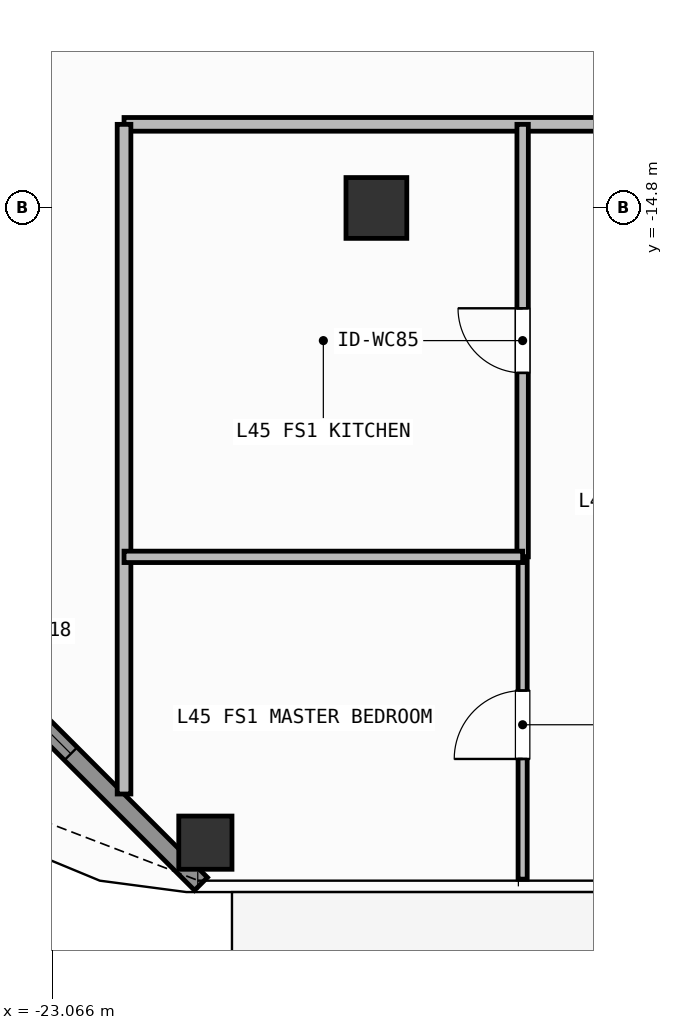
"""IFC4 building model, lengths in metres.
Left out: names, types, materials, properties, quantities, classifications, styles, units other than length and angle.
Written with IfcOpenShell. Run it as: python <this file> out.ifc"""

import sys

from ifc_helpers import new_model, si_unit, direction, frame, frame_2d, origin, origin_2d, place, context, subcontext, project, spatial, rectangle, hollow_rectangle, extrude, element, fill, save


model = new_model("IFC4")
c1 = context("Model", 3, precision=1e-05, world=origin(), true_north=direction((0.0, 1.0)))
c2 = subcontext(c1, "Body", "Model", "MODEL_VIEW")
j1 = project(units=[si_unit("LENGTHUNIT", "METRE"), si_unit("PLANEANGLEUNIT", "RADIAN")], contexts=[c1])
p1 = place(None, origin())
s1 = spatial("IfcSite", under=j1, at=p1, CompositionType="ELEMENT")
p2 = place(p1, origin())
s2 = spatial("IfcBuilding", under=s1, at=p2, CompositionType="ELEMENT")
p3 = place(p2, frame((0.0, 0.0, 183.6)))
s3 = spatial("IfcBuildingStorey", under=s2, at=p3, CompositionType="ELEMENT", Elevation=183.6)
p4 = place(p3, frame((-18.8, -14.8, 0.0), z_axis=(0.0, 0.0, 1.0), x_axis=(1.0, 0.0, 0.0)))
e1 = element("IfcColumn", 1, at=p4, inside=s3, PredefinedType="COLUMN", context=c2, shape_type="SweptSolid", body=[
    extrude(hollow_rectangle(XDim=0.8, YDim=0.8, WallThickness=0.036, at=origin_2d()), origin(), (0.0, 0.0, 1.0), 3.9),
])
p5 = place(p3, frame((-21.05, -23.15, 0.0), z_axis=(0.0, 0.0, 1.0), x_axis=(1.0, 0.0, 0.0)))
e2 = element("IfcColumn", 2, at=p5, inside=s3, PredefinedType="COLUMN", context=c2, shape_type="SweptSolid", body=[
    extrude(hollow_rectangle(XDim=0.7, YDim=0.7, WallThickness=0.032, at=origin_2d()), origin(), (0.0, 0.0, 1.0), 3.9),
])
p6 = place(p3, frame((-21.108, -23.692, 0.0), z_axis=(0.0, 0.0, 1.0), x_axis=(-0.707087534163, 0.707126027686, 0.0)))
e3 = element("IfcWall", 3, at=p6, inside=s3, PredefinedType="SOLIDWALL", context=c2, shape_type="SweptSolid", body=[
    extrude(rectangle(XDim=6.342, YDim=0.24, at=frame_2d((3.171, 0.0))), origin(), (0.0, 0.0, 1.0), 3.68),
])
p7 = place(p6, frame((2.421, 0.0, 0.8)))
e4 = element("IfcOpeningElement", 4, at=p7, cuts=e3, PredefinedType="OPENING", context=c2, shape_type="SweptSolid", body=[
    extrude(rectangle(XDim=1.5, YDim=1.85, at=frame_2d((0.75, 0.925))), frame((0.0, 0.13, 0.0), z_axis=(0.0, -1.0, 0.0), x_axis=(1.0, 0.0, 0.0)), (0.0, 0.0, 1.0), 0.26),
])
p8 = place(p3, frame((-22.12, -13.7, 0.0), z_axis=(0.0, 0.0, 1.0), x_axis=(1.0, 0.0, 0.0)))
e5 = element("IfcWall", 5, at=p8, inside=s3, PredefinedType="PARTITIONING", context=c2, shape_type="SweptSolid", body=[
    extrude(rectangle(XDim=15.502, YDim=0.18, at=frame_2d((7.751, 0.0))), origin(), (0.0, 0.0, 1.0), 3.68),
])
p9 = place(p8, frame((8.059, 0.0, 0.0)))
e6 = element("IfcOpeningElement", 6, at=p9, cuts=e5, PredefinedType="OPENING", context=c2, shape_type="SweptSolid", body=[
    extrude(rectangle(XDim=1.0, YDim=2.2, at=frame_2d((0.5, 1.1))), frame((0.0, 0.1, 0.0), z_axis=(0.0, -1.0, 0.0), x_axis=(1.0, 0.0, 0.0)), (0.0, 0.0, 1.0), 0.2),
])
p10 = place(p3, frame((-16.876, -19.39, 0.0), z_axis=(0.0, 0.0, 1.0), x_axis=(0.0, 1.0, 0.0)))
e7 = element("IfcWall", 7, at=p10, inside=s3, PredefinedType="PARTITIONING", context=c2, shape_type="SweptSolid", body=[
    extrude(rectangle(XDim=5.69, YDim=0.15, at=frame_2d((2.845, 0.0))), origin(), (0.0, 0.0, 1.0), 3.68),
])
p11 = place(p10, frame((2.42, 0.0, 0.0)))
e8 = element("IfcOpeningElement", 8, at=p11, cuts=e7, PredefinedType="OPENING", context=c2, shape_type="SweptSolid", body=[
    extrude(rectangle(XDim=0.85, YDim=2.1, at=frame_2d((0.425, 1.05))), frame((0.0, 0.085, 0.0), z_axis=(0.0, -1.0, 0.0), x_axis=(1.0, 0.0, 0.0)), (0.0, 0.0, 1.0), 0.17),
])
p12 = place(p3, frame((-16.876, -23.63, 0.0), z_axis=(0.0, 0.0, 1.0), x_axis=(0.0, 1.0, 0.0)))
e9 = element("IfcWall", 9, at=p12, inside=s3, PredefinedType="PARTITIONING", context=c2, shape_type="SweptSolid", body=[
    extrude(rectangle(XDim=4.24, YDim=0.12, at=frame_2d((2.12, 0.0))), origin(), (0.0, 0.0, 1.0), 3.68),
])
p13 = place(p12, frame((1.581, 0.0, 0.0)))
e10 = element("IfcOpeningElement", 10, at=p13, cuts=e9, PredefinedType="OPENING", context=c2, shape_type="SweptSolid", body=[
    extrude(rectangle(XDim=0.9, YDim=2.1, at=frame_2d((0.45, 1.05))), frame((0.0, 0.07, 0.0), z_axis=(0.0, -1.0, 0.0), x_axis=(1.0, 0.0, 0.0)), (0.0, 0.0, 1.0), 0.14),
])
p14 = place(p3, frame((-22.12, -22.51, 0.0), z_axis=(0.0, 0.0, 1.0), x_axis=(0.0, 1.0, 0.0)))
e11 = element("IfcWall", 11, at=p14, inside=s3, PredefinedType="PARTITIONING", context=c2, shape_type="SweptSolid", body=[
    extrude(rectangle(XDim=8.81, YDim=0.18, at=frame_2d((4.405, 0.0))), origin(), (0.0, 0.0, 1.0), 3.68),
])
p15 = place(p3, frame((-22.12, -19.39, 0.0), z_axis=(0.0, 0.0, 1.0), x_axis=(1.0, 0.0, 0.0)))
e12 = element("IfcWall", 12, at=p15, inside=s3, PredefinedType="PARTITIONING", context=c2, shape_type="SweptSolid", body=[
    extrude(rectangle(XDim=5.244, YDim=0.15, at=frame_2d((2.622, 0.0))), origin(), (0.0, 0.0, 1.0), 3.68),
])
p16 = place(p7, origin())
e13 = element("IfcWindow", 13, at=p16, inside=s3, PartitioningType="SINGLE_PANEL", PredefinedType="WINDOW", context=c2, shape_type="SweptSolid", body=[
    extrude(rectangle(XDim=1.5, YDim=1.85, at=frame_2d((0.75, 0.925))), frame((0.0, 0.03, 0.0), z_axis=(0.0, -1.0, 0.0), x_axis=(1.0, 0.0, 0.0)), (0.0, 0.0, 1.0), 0.06),
])
fill(e4, e13)
p17 = place(p11, origin())
e14 = element("IfcDoor", 14, at=p17, inside=s3, OperationType="SINGLE_SWING_RIGHT", PredefinedType="DOOR", context=c2, shape_type="SweptSolid", body=[
    extrude(rectangle(XDim=0.85, YDim=2.1, at=frame_2d((0.425, 1.05))), frame((0.0, 0.025, 0.0), z_axis=(0.0, -1.0, 0.0), x_axis=(1.0, 0.0, 0.0)), (0.0, 0.0, 1.0), 0.05),
])
fill(e8, e14)
p18 = place(p13, origin())
e15 = element("IfcDoor", 15, at=p18, inside=s3, OperationType="SINGLE_SWING_LEFT", PredefinedType="DOOR", context=c2, shape_type="SweptSolid", body=[
    extrude(rectangle(XDim=0.9, YDim=2.1, at=frame_2d((0.45, 1.05))), frame((0.0, 0.025, 0.0), z_axis=(0.0, -1.0, 0.0), x_axis=(1.0, 0.0, 0.0)), (0.0, 0.0, 1.0), 0.05),
])
fill(e10, e15)
save(model, sys.argv[1])
